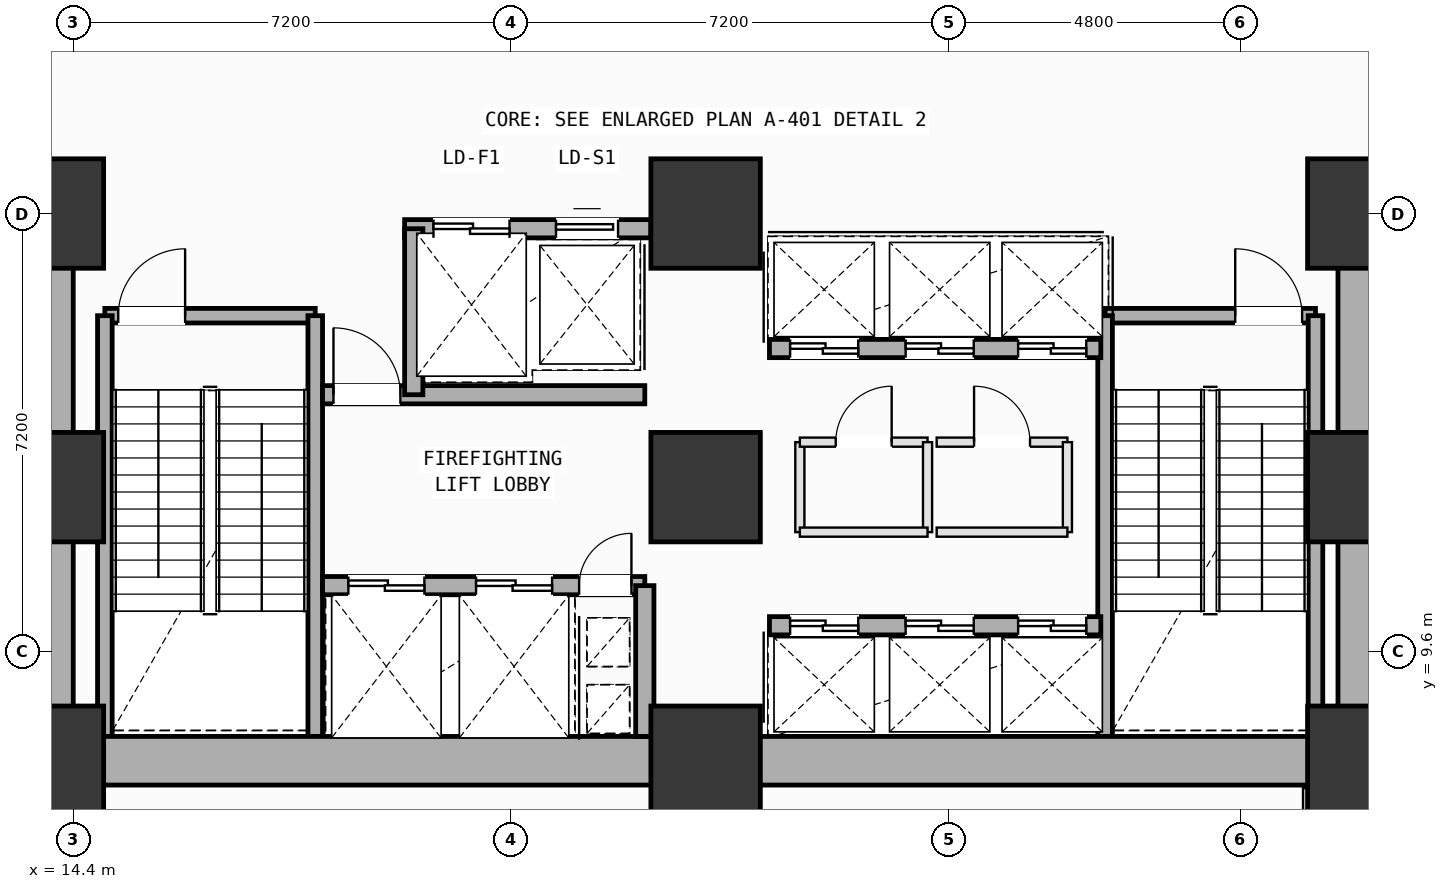
"""IFC4 building model, lengths in metres.
Left out: names, types, materials, properties, quantities, classifications, styles, units other than length and angle.
Written with IfcOpenShell. Run it as: python <this file> out.ifc"""

import sys

from ifc_helpers import new_model, si_unit, direction, frame, frame_2d, origin, origin_2d, place, context, subcontext, project, spatial, rectangle, extrude, element, fill, save


model = new_model("IFC4")
c1 = context("Model", 3, precision=1e-05, world=origin(), true_north=direction((0.0, 1.0)))
c2 = subcontext(c1, "Body", "Model", "MODEL_VIEW")
j1 = project(units=[si_unit("LENGTHUNIT", "METRE"), si_unit("PLANEANGLEUNIT", "RADIAN")], contexts=[c1])
p1 = place(None, origin())
s1 = spatial("IfcSite", under=j1, at=p1, CompositionType="ELEMENT")
p2 = place(p1, origin())
s2 = spatial("IfcBuilding", under=s1, at=p2, CompositionType="ELEMENT")
p3 = place(p2, frame((0.0, 0.0, -4.8)))
s3 = spatial("IfcBuildingStorey", under=s2, at=p3, CompositionType="ELEMENT", Elevation=-4.8)
for number, where, z_axis, x_axis in (
    (1, (14.0, 7.8, 0.0), (0.0, 0.0, 1.0), (1.0, 0.0, 0.0)),
    (2, (14.0, 12.3, 0.0), (0.0, 0.0, 1.0), (1.0, 0.0, 0.0)),
    (3, (14.0, 16.8, 0.0), (0.0, 0.0, 1.0), (1.0, 0.0, 0.0)),
    (4, (24.8, 7.8, 0.0), (0.0, 0.0, 1.0), (1.0, 0.0, 0.0)),
    (5, (24.8, 12.3, 0.0), (0.0, 0.0, 1.0), (1.0, 0.0, 0.0)),
    (6, (24.8, 16.8, 0.0), (0.0, 0.0, 1.0), (1.0, 0.0, 0.0)),
    (7, (35.6, 7.8, 0.0), (0.0, 0.0, 1.0), (1.0, 0.0, 0.0)),
    (8, (35.6, 12.3, 0.0), (0.0, 0.0, 1.0), (1.0, 0.0, 0.0)),
    (9, (35.6, 16.8, 0.0), (0.0, 0.0, 1.0), (1.0, 0.0, 0.0)),
):
    element("IfcColumn", number, at=place(p3, frame(where, z_axis=z_axis, x_axis=x_axis)), inside=s3, PredefinedType="COLUMN", context=c2, shape_type="SweptSolid", body=[
        extrude(rectangle(XDim=1.8, YDim=1.8, at=origin_2d()), origin(), (0.0, 0.0, 1.0), 4.8),
    ])
p4 = place(p3, frame((14.92, 15.12, 0.0), z_axis=(0.0, 0.0, 1.0), x_axis=(1.0, 0.0, 0.0)))
e10 = element("IfcWall", 10, at=p4, inside=s3, PredefinedType="SOLIDWALL", context=c2, shape_type="SweptSolid", body=[
    extrude(rectangle(XDim=3.46, YDim=0.24, at=frame_2d((1.73, 0.0))), origin(), (0.0, 0.0, 1.0), 4.55),
])
p5 = place(p4, frame((0.22, 0.0, 0.0)))
e11 = element("IfcOpeningElement", 11, at=p5, cuts=e10, PredefinedType="OPENING", context=c2, shape_type="SweptSolid", body=[
    extrude(rectangle(XDim=1.1, YDim=2.15, at=frame_2d((0.55, 1.075))), frame((0.0, 0.13, 0.0), z_axis=(0.0, -1.0, 0.0), x_axis=(1.0, 0.0, 0.0)), (0.0, 0.0, 1.0), 0.26),
])
for number, where, z_axis, x_axis in (
    (12, (18.38, 15.12, 0.0), (0.0, 0.0, 1.0), (0.0, -1.0, 0.0)),
    (13, (14.92, 8.2, 0.0), (0.0, 0.0, 1.0), (0.0, 1.0, 0.0)),
):
    element("IfcWall", number, at=place(p3, frame(where, z_axis=z_axis, x_axis=x_axis)), inside=s3, PredefinedType="SOLIDWALL", context=c2, shape_type="SweptSolid", body=[
        extrude(rectangle(XDim=6.92, YDim=0.24, at=frame_2d((3.46, 0.0))), origin(), (0.0, 0.0, 1.0), 4.55),
    ])
p6 = place(p3, frame((31.37, 15.12, 0.0), z_axis=(0.0, 0.0, 1.0), x_axis=(1.0, 0.0, 0.0)))
e14 = element("IfcWall", 14, at=p6, inside=s3, PredefinedType="SOLIDWALL", context=c2, shape_type="SweptSolid", body=[
    extrude(rectangle(XDim=3.46, YDim=0.24, at=frame_2d((1.73, 0.0))), origin(), (0.0, 0.0, 1.0), 4.55),
])
p7 = place(p6, frame((2.14, 0.0, 0.0)))
e15 = element("IfcOpeningElement", 15, at=p7, cuts=e14, PredefinedType="OPENING", context=c2, shape_type="SweptSolid", body=[
    extrude(rectangle(XDim=1.1, YDim=2.15, at=frame_2d((0.55, 1.075))), frame((0.0, 0.13, 0.0), z_axis=(0.0, -1.0, 0.0), x_axis=(1.0, 0.0, 0.0)), (0.0, 0.0, 1.0), 0.26),
])
for number, where, z_axis, x_axis in (
    (16, (34.83, 15.12, 0.0), (0.0, 0.0, 1.0), (0.0, -1.0, 0.0)),
    (17, (31.37, 8.2, 0.0), (0.0, 0.0, 1.0), (0.0, 1.0, 0.0)),
):
    element("IfcWall", number, at=place(p3, frame(where, z_axis=z_axis, x_axis=x_axis)), inside=s3, PredefinedType="SOLIDWALL", context=c2, shape_type="SweptSolid", body=[
        extrude(rectangle(XDim=6.92, YDim=0.24, at=frame_2d((3.46, 0.0))), origin(), (0.0, 0.0, 1.0), 4.55),
    ])
for number, where, z_axis, x_axis in (
    (18, (14.0, 7.8, 0.0), (0.0, 0.0, 1.0), (1.0, 0.0, 0.0)),
    (19, (24.8, 7.8, 0.0), (0.0, 0.0, 1.0), (1.0, 0.0, 0.0)),
):
    element("IfcWall", number, at=place(p3, frame(where, z_axis=z_axis, x_axis=x_axis)), inside=s3, PredefinedType="SHEAR", context=c2, shape_type="SweptSolid", body=[
        extrude(rectangle(XDim=10.8, YDim=0.8, at=frame_2d((5.4, 0.0))), origin(), (0.0, 0.0, 1.0), 4.55),
    ])
for number, where, z_axis, x_axis in (
    (20, (35.6, 7.8, 0.0), (0.0, 0.0, 1.0), (0.0, 1.0, 0.0)),
    (21, (14.0, 16.8, 0.0), (0.0, 0.0, 1.0), (0.0, -1.0, 0.0)),
):
    element("IfcWall", number, at=place(p3, frame(where, z_axis=z_axis, x_axis=x_axis)), inside=s3, PredefinedType="SHEAR", context=c2, shape_type="SweptSolid", body=[
        extrude(rectangle(XDim=9.0, YDim=0.8, at=frame_2d((4.5, 0.0))), origin(), (0.0, 0.0, 1.0), 4.55),
    ])
p8 = place(p3, frame((19.85, 16.55, 0.0), z_axis=(0.0, 0.0, 1.0), x_axis=(1.0, 0.0, 0.0)))
e22 = element("IfcWall", 22, at=p8, inside=s3, PredefinedType="SOLIDWALL", context=c2, shape_type="SweptSolid", body=[
    extrude(rectangle(XDim=4.05, YDim=0.3, at=frame_2d((2.025, 0.0))), origin(), (0.0, 0.0, 1.0), 4.55),
])
p9 = place(p8, frame((0.475, 0.0, 0.0)))
e23 = element("IfcOpeningElement", 23, at=p9, cuts=e22, PredefinedType="OPENING", context=c2, shape_type="SweptSolid", body=[
    extrude(rectangle(XDim=1.25, YDim=2.18, at=frame_2d((0.625, 1.09))), frame((0.0, 0.16, 0.0), z_axis=(0.0, -1.0, 0.0), x_axis=(1.0, 0.0, 0.0)), (0.0, 0.0, 1.0), 0.32),
])
p10 = place(p8, frame((2.49, 0.0, 0.0)))
e24 = element("IfcOpeningElement", 24, at=p10, cuts=e22, PredefinedType="OPENING", context=c2, shape_type="SweptSolid", body=[
    extrude(rectangle(XDim=1.02, YDim=2.12, at=frame_2d((0.51, 1.06))), frame((0.0, 0.16, 0.0), z_axis=(0.0, -1.0, 0.0), x_axis=(1.0, 0.0, 0.0)), (0.0, 0.0, 1.0), 0.32),
])
p11 = place(p3, frame((18.5, 10.68, 0.0), z_axis=(0.0, 0.0, 1.0), x_axis=(1.0, 0.0, 0.0)))
e25 = element("IfcWall", 25, at=p11, inside=s3, PredefinedType="SOLIDWALL", context=c2, shape_type="SweptSolid", body=[
    extrude(rectangle(XDim=5.3, YDim=0.3, at=frame_2d((2.65, 0.0))), origin(), (0.0, 0.0, 1.0), 4.55),
])
p12 = place(p11, frame((4.22, 0.0, 0.0)))
e26 = element("IfcOpeningElement", 26, at=p12, cuts=e25, PredefinedType="OPENING", context=c2, shape_type="SweptSolid", body=[
    extrude(rectangle(XDim=0.86, YDim=2.06, at=frame_2d((0.43, 1.03))), frame((0.0, 0.16, 0.0), z_axis=(0.0, -1.0, 0.0), x_axis=(1.0, 0.0, 0.0)), (0.0, 0.0, 1.0), 0.32),
])
p13 = place(p11, frame((0.425, 0.0, 0.0)))
e27 = element("IfcOpeningElement", 27, at=p13, cuts=e25, PredefinedType="OPENING", context=c2, shape_type="SweptSolid", body=[
    extrude(rectangle(XDim=1.25, YDim=2.18, at=frame_2d((0.625, 1.09))), frame((0.0, 0.16, 0.0), z_axis=(0.0, -1.0, 0.0), x_axis=(1.0, 0.0, 0.0)), (0.0, 0.0, 1.0), 0.32),
])
p14 = place(p11, frame((2.525, 0.0, 0.0)))
e28 = element("IfcOpeningElement", 28, at=p14, cuts=e25, PredefinedType="OPENING", context=c2, shape_type="SweptSolid", body=[
    extrude(rectangle(XDim=1.25, YDim=2.18, at=frame_2d((0.625, 1.09))), frame((0.0, 0.16, 0.0), z_axis=(0.0, -1.0, 0.0), x_axis=(1.0, 0.0, 0.0)), (0.0, 0.0, 1.0), 0.32),
])
p15 = place(p3, frame((18.5, 13.82, 0.0), z_axis=(0.0, 0.0, 1.0), x_axis=(1.0, 0.0, 0.0)))
e29 = element("IfcWall", 29, at=p15, inside=s3, PredefinedType="SOLIDWALL", context=c2, shape_type="SweptSolid", body=[
    extrude(rectangle(XDim=5.3, YDim=0.3, at=frame_2d((2.65, 0.0))), origin(), (0.0, 0.0, 1.0), 4.55),
])
p16 = place(p15, frame((0.18, 0.0, 0.0)))
e30 = element("IfcOpeningElement", 30, at=p16, cuts=e29, PredefinedType="OPENING", context=c2, shape_type="SweptSolid", body=[
    extrude(rectangle(XDim=1.1, YDim=2.15, at=frame_2d((0.55, 1.075))), frame((0.0, 0.16, 0.0), z_axis=(0.0, -1.0, 0.0), x_axis=(1.0, 0.0, 0.0)), (0.0, 0.0, 1.0), 0.32),
])
p17 = place(p3, frame((23.8, 8.2, 0.0), z_axis=(0.0, 0.0, 1.0), x_axis=(0.0, 1.0, 0.0)))
e31 = element("IfcWall", 31, at=p17, inside=s3, PredefinedType="SOLIDWALL", context=c2, shape_type="SweptSolid", body=[
    extrude(rectangle(XDim=2.48, YDim=0.3, at=frame_2d((1.24, 0.0))), origin(), (0.0, 0.0, 1.0), 4.55),
])
p18 = place(p3, frame((20.0, 13.82, 0.0), z_axis=(0.0, 0.0, 1.0), x_axis=(0.0, 1.0, 0.0)))
e32 = element("IfcWall", 32, at=p18, inside=s3, PredefinedType="SOLIDWALL", context=c2, shape_type="SweptSolid", body=[
    extrude(rectangle(XDim=2.73, YDim=0.3, at=frame_2d((1.365, 0.0))), origin(), (0.0, 0.0, 1.0), 4.55),
])
p19 = place(p3, frame((25.85, 10.02, 0.0), z_axis=(0.0, 0.0, 1.0), x_axis=(1.0, 0.0, 0.0)))
e33 = element("IfcWall", 33, at=p19, inside=s3, PredefinedType="SOLIDWALL", context=c2, shape_type="SweptSolid", body=[
    extrude(rectangle(XDim=5.45, YDim=0.3, at=frame_2d((2.725, 0.0))), origin(), (0.0, 0.0, 1.0), 4.55),
])
p20 = place(p19, frame((0.34, 0.0, 0.0)))
e34 = element("IfcOpeningElement", 34, at=p20, cuts=e33, PredefinedType="OPENING", context=c2, shape_type="SweptSolid", body=[
    extrude(rectangle(XDim=1.12, YDim=2.15, at=frame_2d((0.56, 1.075))), frame((0.0, 0.16, 0.0), z_axis=(0.0, -1.0, 0.0), x_axis=(1.0, 0.0, 0.0)), (0.0, 0.0, 1.0), 0.32),
])
p21 = place(p19, frame((2.24, 0.0, 0.0)))
e35 = element("IfcOpeningElement", 35, at=p21, cuts=e33, PredefinedType="OPENING", context=c2, shape_type="SweptSolid", body=[
    extrude(rectangle(XDim=1.12, YDim=2.15, at=frame_2d((0.56, 1.075))), frame((0.0, 0.16, 0.0), z_axis=(0.0, -1.0, 0.0), x_axis=(1.0, 0.0, 0.0)), (0.0, 0.0, 1.0), 0.32),
])
p22 = place(p19, frame((4.09, 0.0, 0.0)))
e36 = element("IfcOpeningElement", 36, at=p22, cuts=e33, PredefinedType="OPENING", context=c2, shape_type="SweptSolid", body=[
    extrude(rectangle(XDim=1.12, YDim=2.15, at=frame_2d((0.56, 1.075))), frame((0.0, 0.16, 0.0), z_axis=(0.0, -1.0, 0.0), x_axis=(1.0, 0.0, 0.0)), (0.0, 0.0, 1.0), 0.32),
])
p23 = place(p3, frame((25.85, 14.58, 0.0), z_axis=(0.0, 0.0, 1.0), x_axis=(1.0, 0.0, 0.0)))
e37 = element("IfcWall", 37, at=p23, inside=s3, PredefinedType="SOLIDWALL", context=c2, shape_type="SweptSolid", body=[
    extrude(rectangle(XDim=5.45, YDim=0.3, at=frame_2d((2.725, 0.0))), origin(), (0.0, 0.0, 1.0), 4.55),
])
p24 = place(p23, frame((0.34, 0.0, 0.0)))
e38 = element("IfcOpeningElement", 38, at=p24, cuts=e37, PredefinedType="OPENING", context=c2, shape_type="SweptSolid", body=[
    extrude(rectangle(XDim=1.12, YDim=2.15, at=frame_2d((0.56, 1.075))), frame((0.0, 0.16, 0.0), z_axis=(0.0, -1.0, 0.0), x_axis=(1.0, 0.0, 0.0)), (0.0, 0.0, 1.0), 0.32),
])
p25 = place(p23, frame((2.24, 0.0, 0.0)))
e39 = element("IfcOpeningElement", 39, at=p25, cuts=e37, PredefinedType="OPENING", context=c2, shape_type="SweptSolid", body=[
    extrude(rectangle(XDim=1.12, YDim=2.15, at=frame_2d((0.56, 1.075))), frame((0.0, 0.16, 0.0), z_axis=(0.0, -1.0, 0.0), x_axis=(1.0, 0.0, 0.0)), (0.0, 0.0, 1.0), 0.32),
])
p26 = place(p23, frame((4.09, 0.0, 0.0)))
e40 = element("IfcOpeningElement", 40, at=p26, cuts=e37, PredefinedType="OPENING", context=c2, shape_type="SweptSolid", body=[
    extrude(rectangle(XDim=1.12, YDim=2.15, at=frame_2d((0.56, 1.075))), frame((0.0, 0.16, 0.0), z_axis=(0.0, -1.0, 0.0), x_axis=(1.0, 0.0, 0.0)), (0.0, 0.0, 1.0), 0.32),
])
p27 = place(p3, frame((26.35, 11.56, 0.0), z_axis=(0.0, 0.0, 1.0), x_axis=(0.0, 1.0, 0.0)))
e41 = element("IfcWall", 41, at=p27, inside=s3, PredefinedType="PARTITIONING", context=c2, shape_type="SweptSolid", body=[
    extrude(rectangle(XDim=1.48, YDim=0.15, at=frame_2d((0.74, 0.0))), origin(), (0.0, 0.0, 1.0), 4.55),
])
p28 = place(p3, frame((26.35, 13.04, 0.0), z_axis=(0.0, 0.0, 1.0), x_axis=(1.0, 0.0, 0.0)))
e42 = element("IfcWall", 42, at=p28, inside=s3, PredefinedType="PARTITIONING", context=c2, shape_type="SweptSolid", body=[
    extrude(rectangle(XDim=2.1, YDim=0.15, at=frame_2d((1.05, 0.0))), origin(), (0.0, 0.0, 1.0), 4.55),
])
p29 = place(p28, frame((0.59, 0.0, 0.0)))
e43 = element("IfcOpeningElement", 43, at=p29, cuts=e42, PredefinedType="OPENING", context=c2, shape_type="SweptSolid", body=[
    extrude(rectangle(XDim=0.92, YDim=2.1, at=frame_2d((0.46, 1.05))), frame((0.0, 0.085, 0.0), z_axis=(0.0, -1.0, 0.0), x_axis=(1.0, 0.0, 0.0)), (0.0, 0.0, 1.0), 0.17),
])
p30 = place(p3, frame((28.45, 13.04, 0.0), z_axis=(0.0, 0.0, 1.0), x_axis=(0.0, -1.0, 0.0)))
e44 = element("IfcWall", 44, at=p30, inside=s3, PredefinedType="PARTITIONING", context=c2, shape_type="SweptSolid", body=[
    extrude(rectangle(XDim=1.48, YDim=0.15, at=frame_2d((0.74, 0.0))), origin(), (0.0, 0.0, 1.0), 4.55),
])
p31 = place(p3, frame((28.45, 11.56, 0.0), z_axis=(0.0, 0.0, 1.0), x_axis=(-1.0, 0.0, 0.0)))
e45 = element("IfcWall", 45, at=p31, inside=s3, PredefinedType="PARTITIONING", context=c2, shape_type="SweptSolid", body=[
    extrude(rectangle(XDim=2.1, YDim=0.15, at=frame_2d((1.05, 0.0))), origin(), (0.0, 0.0, 1.0), 4.55),
])
p32 = place(p3, frame((28.6, 13.04, 0.0), z_axis=(0.0, 0.0, 1.0), x_axis=(1.0, 0.0, 0.0)))
e46 = element("IfcWall", 46, at=p32, inside=s3, PredefinedType="PARTITIONING", context=c2, shape_type="SweptSolid", body=[
    extrude(rectangle(XDim=2.15, YDim=0.15, at=frame_2d((1.075, 0.0))), origin(), (0.0, 0.0, 1.0), 4.55),
])
p33 = place(p32, frame((0.615, 0.0, 0.0)))
e47 = element("IfcOpeningElement", 47, at=p33, cuts=e46, PredefinedType="OPENING", context=c2, shape_type="SweptSolid", body=[
    extrude(rectangle(XDim=0.92, YDim=2.1, at=frame_2d((0.46, 1.05))), frame((0.0, 0.085, 0.0), z_axis=(0.0, -1.0, 0.0), x_axis=(1.0, 0.0, 0.0)), (0.0, 0.0, 1.0), 0.17),
])
p34 = place(p3, frame((30.75, 13.04, 0.0), z_axis=(0.0, 0.0, 1.0), x_axis=(0.0, -1.0, 0.0)))
e48 = element("IfcWall", 48, at=p34, inside=s3, PredefinedType="PARTITIONING", context=c2, shape_type="SweptSolid", body=[
    extrude(rectangle(XDim=1.48, YDim=0.15, at=frame_2d((0.74, 0.0))), origin(), (0.0, 0.0, 1.0), 4.55),
])
p35 = place(p3, frame((30.75, 11.56, 0.0), z_axis=(0.0, 0.0, 1.0), x_axis=(-1.0, 0.0, 0.0)))
e49 = element("IfcWall", 49, at=p35, inside=s3, PredefinedType="PARTITIONING", context=c2, shape_type="SweptSolid", body=[
    extrude(rectangle(XDim=2.15, YDim=0.15, at=frame_2d((1.075, 0.0))), origin(), (0.0, 0.0, 1.0), 4.55),
])
p36 = place(p3, frame((34.7, 7.35, 0.0), z_axis=(0.0, 0.0, 1.0), x_axis=(0.0, -1.0, 0.0)))
e50 = element("IfcWall", 50, at=p36, inside=s3, PredefinedType="PARTITIONING", context=c2, shape_type="SweptSolid", body=[
    extrude(rectangle(XDim=6.75, YDim=0.15, at=frame_2d((3.375, 0.0))), origin(), (0.0, 0.0, 1.0), 4.55),
])
p37 = place(p5, origin())
e51 = element("IfcDoor", 51, at=p37, inside=s3, OperationType="SINGLE_SWING_RIGHT", PredefinedType="DOOR", context=c2, shape_type="SweptSolid", body=[
    extrude(rectangle(XDim=1.1, YDim=2.15, at=frame_2d((0.55, 1.075))), frame((0.0, 0.025, 0.0), z_axis=(0.0, -1.0, 0.0), x_axis=(1.0, 0.0, 0.0)), (0.0, 0.0, 1.0), 0.05),
])
fill(e11, e51)
p38 = place(p7, origin())
e52 = element("IfcDoor", 52, at=p38, inside=s3, OperationType="SINGLE_SWING_LEFT", PredefinedType="DOOR", context=c2, shape_type="SweptSolid", body=[
    extrude(rectangle(XDim=1.1, YDim=2.15, at=frame_2d((0.55, 1.075))), frame((0.0, 0.025, 0.0), z_axis=(0.0, -1.0, 0.0), x_axis=(1.0, 0.0, 0.0)), (0.0, 0.0, 1.0), 0.05),
])
fill(e15, e52)
p39 = place(p12, origin())
e53 = element("IfcDoor", 53, at=p39, inside=s3, OperationType="SINGLE_SWING_RIGHT", PredefinedType="DOOR", context=c2, shape_type="SweptSolid", body=[
    extrude(rectangle(XDim=0.86, YDim=2.06, at=frame_2d((0.43, 1.03))), frame((0.0, 0.025, 0.0), z_axis=(0.0, -1.0, 0.0), x_axis=(1.0, 0.0, 0.0)), (0.0, 0.0, 1.0), 0.05),
])
fill(e26, e53)
p40 = place(p16, origin())
e54 = element("IfcDoor", 54, at=p40, inside=s3, OperationType="SINGLE_SWING_LEFT", PredefinedType="DOOR", context=c2, shape_type="SweptSolid", body=[
    extrude(rectangle(XDim=1.1, YDim=2.15, at=frame_2d((0.55, 1.075))), frame((0.0, 0.025, 0.0), z_axis=(0.0, -1.0, 0.0), x_axis=(1.0, 0.0, 0.0)), (0.0, 0.0, 1.0), 0.05),
])
fill(e30, e54)
p41 = place(p13, origin())
e55 = element("IfcDoor", 55, at=p41, inside=s3, OperationType="DOUBLE_DOOR_SLIDING", PredefinedType="DOOR", context=c2, shape_type="SweptSolid", body=[
    extrude(rectangle(XDim=1.25, YDim=2.18, at=frame_2d((0.625, 1.09))), frame((0.0, 0.025, 0.0), z_axis=(0.0, -1.0, 0.0), x_axis=(1.0, 0.0, 0.0)), (0.0, 0.0, 1.0), 0.05),
])
fill(e27, e55)
p42 = place(p14, origin())
e56 = element("IfcDoor", 56, at=p42, inside=s3, OperationType="DOUBLE_DOOR_SLIDING", PredefinedType="DOOR", context=c2, shape_type="SweptSolid", body=[
    extrude(rectangle(XDim=1.25, YDim=2.18, at=frame_2d((0.625, 1.09))), frame((0.0, 0.025, 0.0), z_axis=(0.0, -1.0, 0.0), x_axis=(1.0, 0.0, 0.0)), (0.0, 0.0, 1.0), 0.05),
])
fill(e28, e56)
p43 = place(p20, origin())
e57 = element("IfcDoor", 57, at=p43, inside=s3, OperationType="DOUBLE_DOOR_SLIDING", PredefinedType="DOOR", context=c2, shape_type="SweptSolid", body=[
    extrude(rectangle(XDim=1.12, YDim=2.15, at=frame_2d((0.56, 1.075))), frame((0.0, 0.025, 0.0), z_axis=(0.0, -1.0, 0.0), x_axis=(1.0, 0.0, 0.0)), (0.0, 0.0, 1.0), 0.05),
])
fill(e34, e57)
p44 = place(p21, origin())
e58 = element("IfcDoor", 58, at=p44, inside=s3, OperationType="DOUBLE_DOOR_SLIDING", PredefinedType="DOOR", context=c2, shape_type="SweptSolid", body=[
    extrude(rectangle(XDim=1.12, YDim=2.15, at=frame_2d((0.56, 1.075))), frame((0.0, 0.025, 0.0), z_axis=(0.0, -1.0, 0.0), x_axis=(1.0, 0.0, 0.0)), (0.0, 0.0, 1.0), 0.05),
])
fill(e35, e58)
p45 = place(p22, origin())
e59 = element("IfcDoor", 59, at=p45, inside=s3, OperationType="DOUBLE_DOOR_SLIDING", PredefinedType="DOOR", context=c2, shape_type="SweptSolid", body=[
    extrude(rectangle(XDim=1.12, YDim=2.15, at=frame_2d((0.56, 1.075))), frame((0.0, 0.025, 0.0), z_axis=(0.0, -1.0, 0.0), x_axis=(1.0, 0.0, 0.0)), (0.0, 0.0, 1.0), 0.05),
])
fill(e36, e59)
p46 = place(p24, origin())
e60 = element("IfcDoor", 60, at=p46, inside=s3, OperationType="DOUBLE_DOOR_SLIDING", PredefinedType="DOOR", context=c2, shape_type="SweptSolid", body=[
    extrude(rectangle(XDim=1.12, YDim=2.15, at=frame_2d((0.56, 1.075))), frame((0.0, 0.025, 0.0), z_axis=(0.0, -1.0, 0.0), x_axis=(1.0, 0.0, 0.0)), (0.0, 0.0, 1.0), 0.05),
])
fill(e38, e60)
p47 = place(p25, origin())
e61 = element("IfcDoor", 61, at=p47, inside=s3, OperationType="DOUBLE_DOOR_SLIDING", PredefinedType="DOOR", context=c2, shape_type="SweptSolid", body=[
    extrude(rectangle(XDim=1.12, YDim=2.15, at=frame_2d((0.56, 1.075))), frame((0.0, 0.025, 0.0), z_axis=(0.0, -1.0, 0.0), x_axis=(1.0, 0.0, 0.0)), (0.0, 0.0, 1.0), 0.05),
])
fill(e39, e61)
p48 = place(p26, origin())
e62 = element("IfcDoor", 62, at=p48, inside=s3, OperationType="DOUBLE_DOOR_SLIDING", PredefinedType="DOOR", context=c2, shape_type="SweptSolid", body=[
    extrude(rectangle(XDim=1.12, YDim=2.15, at=frame_2d((0.56, 1.075))), frame((0.0, 0.025, 0.0), z_axis=(0.0, -1.0, 0.0), x_axis=(1.0, 0.0, 0.0)), (0.0, 0.0, 1.0), 0.05),
])
fill(e40, e62)
p49 = place(p9, origin())
e63 = element("IfcDoor", 63, at=p49, inside=s3, OperationType="DOUBLE_DOOR_SLIDING", PredefinedType="DOOR", context=c2, shape_type="SweptSolid", body=[
    extrude(rectangle(XDim=1.25, YDim=2.18, at=frame_2d((0.625, 1.09))), frame((0.0, 0.025, 0.0), z_axis=(0.0, -1.0, 0.0), x_axis=(1.0, 0.0, 0.0)), (0.0, 0.0, 1.0), 0.05),
])
fill(e23, e63)
p50 = place(p10, origin())
e64 = element("IfcDoor", 64, at=p50, inside=s3, OperationType="SLIDING_TO_LEFT", PredefinedType="DOOR", context=c2, shape_type="SweptSolid", body=[
    extrude(rectangle(XDim=1.02, YDim=2.12, at=frame_2d((0.51, 1.06))), frame((0.0, 0.025, 0.0), z_axis=(0.0, -1.0, 0.0), x_axis=(1.0, 0.0, 0.0)), (0.0, 0.0, 1.0), 0.05),
])
fill(e24, e64)
p51 = place(p29, origin())
e65 = element("IfcDoor", 65, at=p51, inside=s3, OperationType="SINGLE_SWING_RIGHT", PredefinedType="DOOR", context=c2, shape_type="SweptSolid", body=[
    extrude(rectangle(XDim=0.92, YDim=2.1, at=frame_2d((0.46, 1.05))), frame((0.0, 0.025, 0.0), z_axis=(0.0, -1.0, 0.0), x_axis=(1.0, 0.0, 0.0)), (0.0, 0.0, 1.0), 0.05),
])
fill(e43, e65)
p52 = place(p33, origin())
e66 = element("IfcDoor", 66, at=p52, inside=s3, OperationType="SINGLE_SWING_LEFT", PredefinedType="DOOR", context=c2, shape_type="SweptSolid", body=[
    extrude(rectangle(XDim=0.92, YDim=2.1, at=frame_2d((0.46, 1.05))), frame((0.0, 0.025, 0.0), z_axis=(0.0, -1.0, 0.0), x_axis=(1.0, 0.0, 0.0)), (0.0, 0.0, 1.0), 0.05),
])
fill(e47, e66)
save(model, sys.argv[1])
